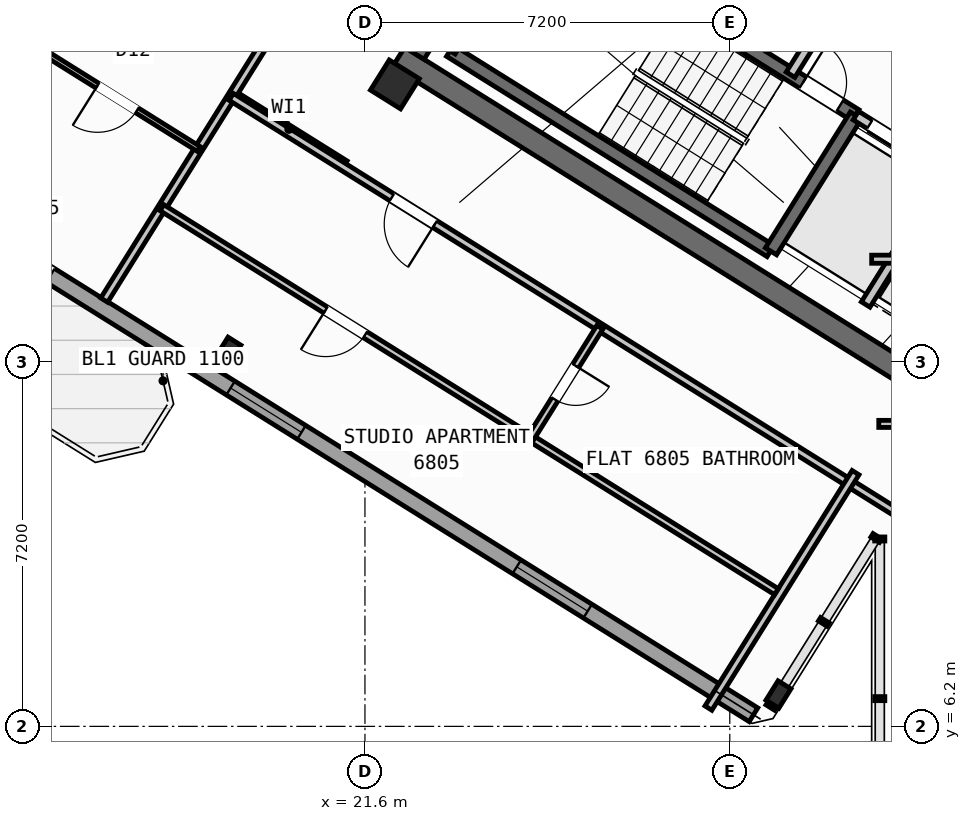
"""IFC4 building model, lengths in metres.
Left out: names, types, materials, properties, quantities, classifications, styles, units other than length and angle.
Written with IfcOpenShell. Run it as: python <this file> out.ifc"""

import sys

from ifc_helpers import new_model, si_unit, direction, frame, frame_2d, origin, origin_2d, place, context, subcontext, project, spatial, rectangle, hollow_rectangle, i_section, extrude, source, transform, mapped, element, fill, save


model = new_model("IFC4")
c1 = context("Model", 3, precision=1e-05, world=origin(), true_north=direction((0.0, 1.0)))
c2 = subcontext(c1, "Body", "Model", "MODEL_VIEW")
j1 = project(units=[si_unit("LENGTHUNIT", "METRE"), si_unit("PLANEANGLEUNIT", "RADIAN")], contexts=[c1])
p1 = place(None, origin())
s1 = spatial("IfcSite", under=j1, at=p1, CompositionType="ELEMENT")
p2 = place(p1, origin())
s2 = spatial("IfcBuilding", under=s1, at=p2, CompositionType="ELEMENT")
p3 = place(p2, frame((0.0, 0.0, 270.0)))
s3 = spatial("IfcBuildingStorey", under=s2, at=p3, CompositionType="ELEMENT", Elevation=270.0)
p4 = place(p3, frame((33.324, 12.503, 0.0), z_axis=(0.0, 0.0, 1.0), x_axis=(-0.848043529849, 0.529926571782, 0.0)))
e1 = element("IfcWall", 1, at=p4, inside=s3, PredefinedType="SHEAR", context=c2, shape_type="SweptSolid", body=[
    extrude(rectangle(XDim=13.04, YDim=0.45, at=frame_2d((6.52, 0.0))), origin(), (0.0, 0.0, 1.0), 3.35),
])
p5 = place(p3, frame((26.007, 24.976, 0.0), z_axis=(0.0, 0.0, 1.0), x_axis=(-0.529931155655, -0.848040665456, 0.0)))
e2 = element("IfcWall", 2, at=p5, inside=s3, PredefinedType="SHEAR", context=c2, shape_type="SweptSolid", body=[
    extrude(rectangle(XDim=6.475, YDim=0.45, at=frame_2d((3.238, 0.0))), origin(), (0.0, 0.0, 1.0), 3.35),
])
m1 = source(origin(), c2, "Body", "SweptSolid", [
    extrude(i_section(OverallWidth=0.3, OverallDepth=0.45, WebThickness=0.014, FlangeThickness=0.026, at=origin_2d()), origin(), (0.0, 0.0, 1.0), 3.6),
])
p6 = place(p3, frame((29.761, 6.829, 0.0), z_axis=(0.0, 0.0, 1.0), x_axis=(-0.848048096156, 0.529919264233, 0.0)))
e3 = element("IfcColumn", 3, at=p6, inside=s3, PredefinedType="COLUMN", context=c2, shape_type="MappedRepresentation", body=[
    mapped(m1, transform((0.0, 0.0, 0.0), scale=1.0)),
])
m2 = source(origin(), c2, "Body", "SweptSolid", [
    extrude(hollow_rectangle(XDim=0.7, YDim=0.7, WallThickness=0.028, at=origin_2d()), origin(), (0.0, 0.0, 1.0), 3.6),
])
p7 = place(p3, frame((22.191, 18.87, 0.0), z_axis=(0.0, 0.0, 1.0), x_axis=(-0.848048096156, 0.529919264233, 0.0)))
e4 = element("IfcColumn", 4, at=p7, inside=s3, PredefinedType="COLUMN", context=c2, shape_type="MappedRepresentation", body=[
    mapped(m2, transform((0.0, 0.0, 0.0), scale=1.0)),
])
p8 = place(p3, frame((18.906, 13.612, 0.0), z_axis=(0.0, 0.0, 1.0), x_axis=(-0.848048096156, 0.529919264233, 0.0)))
e5 = element("IfcColumn", 5, at=p8, inside=s3, PredefinedType="COLUMN", context=c2, shape_type="MappedRepresentation", body=[
    mapped(m1, transform((0.0, 0.0, 0.0), scale=1.0)),
])
p9 = place(p3, frame((29.268, 6.429, 0.0), z_axis=(0.0, 0.0, 1.0), x_axis=(-0.848049971435, 0.529916263149, 0.0)))
e6 = element("IfcWall", 6, at=p9, inside=s3, PredefinedType="STANDARD", context=c2, shape_type="SweptSolid", body=[
    extrude(rectangle(XDim=31.588, YDim=0.32, at=frame_2d((15.794, 0.0))), origin(), (0.0, 0.0, 1.0), 3.35),
])
p10 = place(p9, frame((16.362, 0.0, 0.0)))
e7 = element("IfcOpeningElement", 7, at=p10, cuts=e6, PredefinedType="OPENING", context=c2, shape_type="SweptSolid", body=[
    extrude(rectangle(XDim=1.2, YDim=2.15, at=frame_2d((0.6, 1.075))), frame((0.0, 0.17, 0.0), z_axis=(0.0, -1.0, 0.0), x_axis=(1.0, 0.0, 0.0)), (0.0, 0.0, 1.0), 0.34),
])
p11 = place(p9, frame((3.859, 0.0, 0.9)))
e8 = element("IfcOpeningElement", 8, at=p11, cuts=e6, PredefinedType="OPENING", context=c2, shape_type="SweptSolid", body=[
    extrude(rectangle(XDim=1.65, YDim=1.45, at=frame_2d((0.825, 0.725))), frame((0.0, 0.17, 0.0), z_axis=(0.0, -1.0, 0.0), x_axis=(1.0, 0.0, 0.0)), (0.0, 0.0, 1.0), 0.34),
])
p12 = place(p9, frame((10.519, 0.0, 0.9)))
e9 = element("IfcOpeningElement", 9, at=p12, cuts=e6, PredefinedType="OPENING", context=c2, shape_type="SweptSolid", body=[
    extrude(rectangle(XDim=1.65, YDim=1.45, at=frame_2d((0.825, 0.725))), frame((0.0, 0.17, 0.0), z_axis=(0.0, -1.0, 0.0), x_axis=(1.0, 0.0, 0.0)), (0.0, 0.0, 1.0), 0.34),
])
p13 = place(p9, frame((21.219, 0.0, 0.95)))
e10 = element("IfcOpeningElement", 10, at=p13, cuts=e6, PredefinedType="OPENING", context=c2, shape_type="SweptSolid", body=[
    extrude(rectangle(XDim=1.95, YDim=1.35, at=frame_2d((0.975, 0.675))), frame((0.0, 0.17, 0.0), z_axis=(0.0, -1.0, 0.0), x_axis=(1.0, 0.0, 0.0)), (0.0, 0.0, 1.0), 0.34),
])
p14 = place(p9, frame((26.406, 0.0, 1.0)))
e11 = element("IfcOpeningElement", 11, at=p14, cuts=e6, PredefinedType="OPENING", context=c2, shape_type="SweptSolid", body=[
    extrude(rectangle(XDim=0.9, YDim=1.25, at=frame_2d((0.45, 0.625))), frame((0.0, 0.17, 0.0), z_axis=(0.0, -1.0, 0.0), x_axis=(1.0, 0.0, 0.0)), (0.0, 0.0, 1.0), 0.34),
])
p15 = place(p9, frame((29.143, 0.0, 0.9)))
e12 = element("IfcOpeningElement", 12, at=p15, cuts=e6, PredefinedType="OPENING", context=c2, shape_type="SweptSolid", body=[
    extrude(rectangle(XDim=1.65, YDim=1.45, at=frame_2d((0.825, 0.725))), frame((0.0, 0.17, 0.0), z_axis=(0.0, -1.0, 0.0), x_axis=(1.0, 0.0, 0.0)), (0.0, 0.0, 1.0), 0.34),
])
p16 = place(p3, frame((29.605, 15.581, 0.0), z_axis=(0.0, 0.0, 1.0), x_axis=(-0.848036911448, 0.529937163087, 0.0)))
e13 = element("IfcWall", 13, at=p16, inside=s3, PredefinedType="SHEAR", context=c2, shape_type="SweptSolid", body=[
    extrude(rectangle(XDim=7.46, YDim=0.26, at=frame_2d((3.73, 0.0))), origin(), (0.0, 0.0, 1.0), 3.35),
])
p17 = place(p3, frame((31.28, 18.261, 0.0), z_axis=(0.0, 0.0, 1.0), x_axis=(-0.848051618787, 0.529913626805, 0.0)))
e14 = element("IfcWall", 14, at=p17, inside=s3, PredefinedType="SHEAR", context=c2, shape_type="SweptSolid", body=[
    extrude(rectangle(XDim=7.46, YDim=0.26, at=frame_2d((3.73, 0.0))), origin(), (0.0, 0.0, 1.0), 3.35),
])
p18 = place(p17, frame((0.36, 0.0, 0.0)))
e15 = element("IfcOpeningElement", 15, at=p18, cuts=e14, PredefinedType="OPENING", context=c2, shape_type="SweptSolid", body=[
    extrude(rectangle(XDim=0.86, YDim=2.05, at=frame_2d((0.43, 1.025))), frame((0.0, 0.14, 0.0), z_axis=(0.0, -1.0, 0.0), x_axis=(1.0, 0.0, 0.0)), (0.0, 0.0, 1.0), 0.28),
])
p19 = place(p3, frame((31.288, 18.256, 0.0), z_axis=(0.0, 0.0, 1.0), x_axis=(-0.529943379326, -0.848033026897, 0.0)))
e16 = element("IfcWall", 16, at=p19, inside=s3, PredefinedType="SHEAR", context=c2, shape_type="SweptSolid", body=[
    extrude(rectangle(XDim=3.16, YDim=0.26, at=frame_2d((1.58, 0.0))), origin(), (0.0, 0.0, 1.0), 3.35),
])
p20 = place(p3, frame((24.945, 22.22, 0.0), z_axis=(0.0, 0.0, 1.0), x_axis=(-0.529908658664, -0.84805472316, 0.0)))
e17 = element("IfcWall", 17, at=p20, inside=s3, PredefinedType="SHEAR", context=c2, shape_type="SweptSolid", body=[
    extrude(rectangle(XDim=3.16, YDim=0.26, at=frame_2d((1.58, 0.0))), origin(), (0.0, 0.0, 1.0), 3.35),
])
p21 = place(p3, frame((34.933, 15.978, 0.0), z_axis=(0.0, 0.0, 1.0), x_axis=(-0.848055739377, 0.529907032327, 0.0)))
e18 = element("IfcWall", 18, at=p21, inside=s3, PredefinedType="STANDARD", context=c2, shape_type="SweptSolid", body=[
    extrude(rectangle(XDim=4.298, YDim=0.2, at=frame_2d((2.149, 0.0))), origin(), (0.0, 0.0, 1.0), 3.34),
])
p22 = place(p21, frame((0.448, 0.0, 0.0)))
e19 = element("IfcOpeningElement", 19, at=p22, cuts=e18, PredefinedType="OPENING", context=c2, shape_type="SweptSolid", body=[
    extrude(rectangle(XDim=1.3, YDim=2.2, at=frame_2d((0.65, 1.1))), frame((0.0, 0.11, 0.0), z_axis=(0.0, -1.0, 0.0), x_axis=(1.0, 0.0, 0.0)), (0.0, 0.0, 1.0), 0.22),
])
p23 = place(p21, frame((2.523, 0.0, 0.0)))
e20 = element("IfcOpeningElement", 20, at=p23, cuts=e18, PredefinedType="OPENING", context=c2, shape_type="SweptSolid", body=[
    extrude(rectangle(XDim=1.45, YDim=2.25, at=frame_2d((0.725, 1.125))), frame((0.0, 0.11, 0.0), z_axis=(0.0, -1.0, 0.0), x_axis=(1.0, 0.0, 0.0)), (0.0, 0.0, 1.0), 0.22),
])
p24 = place(p3, frame((36.459, 18.421, 0.0), z_axis=(0.0, 0.0, 1.0), x_axis=(-0.848059591691, 0.529900867089, 0.0)))
e21 = element("IfcWall", 21, at=p24, inside=s3, PredefinedType="STANDARD", context=c2, shape_type="SweptSolid", body=[
    extrude(rectangle(XDim=5.818, YDim=0.2, at=frame_2d((2.909, 0.0))), origin(), (0.0, 0.0, 1.0), 3.34),
])
p25 = place(p24, frame((2.598, 0.0, 0.0)))
e22 = element("IfcOpeningElement", 22, at=p25, cuts=e21, PredefinedType="OPENING", context=c2, shape_type="SweptSolid", body=[
    extrude(rectangle(XDim=1.15, YDim=2.1, at=frame_2d((0.575, 1.05))), frame((0.0, 0.11, 0.0), z_axis=(0.0, -1.0, 0.0), x_axis=(1.0, 0.0, 0.0)), (0.0, 0.0, 1.0), 0.22),
])
p26 = place(p3, frame((33.029, 17.003, 0.0), z_axis=(0.0, 0.0, 1.0), x_axis=(-0.529916267533, -0.848049968695, 0.0)))
e23 = element("IfcWall", 23, at=p26, inside=s3, PredefinedType="STANDARD", context=c2, shape_type="SweptSolid", body=[
    extrude(rectangle(XDim=2.92, YDim=0.2, at=frame_2d((1.46, 0.0))), origin(), (0.0, 0.0, 1.0), 3.34),
])
p27 = place(p3, frame((31.525, 21.504, 0.0), z_axis=(0.0, 0.0, 1.0), x_axis=(-0.529907497854, -0.848055448493, 0.0)))
e24 = element("IfcWall", 24, at=p27, inside=s3, PredefinedType="STANDARD", context=c2, shape_type="SweptSolid", body=[
    extrude(rectangle(XDim=2.88, YDim=0.2, at=frame_2d((1.44, 0.0))), origin(), (0.0, 0.0, 1.0), 3.34),
])
p28 = place(p3, frame((21.206, 17.292, 0.0), z_axis=(0.0, 0.0, 1.0), x_axis=(-0.848050851465, 0.529914854792, 0.0)))
e25 = element("IfcWall", 25, at=p28, inside=s3, PredefinedType="PARTITIONING", context=c2, shape_type="SweptSolid", body=[
    extrude(rectangle(XDim=2.61, YDim=0.16, at=frame_2d((1.305, 0.0))), origin(), (0.0, 0.0, 1.0), 3.34),
])
p29 = place(p3, frame((21.329, 22.416, 0.0), z_axis=(0.0, 0.0, 1.0), x_axis=(-0.529920220799, -0.848047498427, 0.0)))
e26 = element("IfcWall", 26, at=p29, inside=s3, PredefinedType="PARTITIONING", context=c2, shape_type="SweptSolid", body=[
    extrude(rectangle(XDim=9.2, YDim=0.16, at=frame_2d((4.6, 0.0))), origin(), (0.0, 0.0, 1.0), 3.34),
])
p30 = place(p3, frame((16.572, 21.954, 0.0), z_axis=(0.0, 0.0, 1.0), x_axis=(-0.529904903214, -0.848057069748, 0.0)))
e27 = element("IfcWall", 27, at=p30, inside=s3, PredefinedType="PARTITIONING", context=c2, shape_type="SweptSolid", body=[
    extrude(rectangle(XDim=5.601, YDim=0.16, at=frame_2d((2.801, 0.0))), origin(), (0.0, 0.0, 1.0), 2.875),
])
p31 = place(p3, frame((18.318, 17.597, 0.0), z_axis=(0.0, 0.0, 1.0), x_axis=(-0.848059820872, 0.529900500304, 0.0)))
e28 = element("IfcWall", 28, at=p31, inside=s3, PredefinedType="PARTITIONING", context=c2, shape_type="SweptSolid", body=[
    extrude(rectangle(XDim=3.79, YDim=0.11, at=frame_2d((1.895, 0.0))), origin(), (0.0, 0.0, 1.0), 3.34),
])
p32 = place(p31, frame((1.435, 0.0, 0.0)))
e29 = element("IfcOpeningElement", 29, at=p32, cuts=e28, PredefinedType="OPENING", context=c2, shape_type="SweptSolid", body=[
    extrude(rectangle(XDim=0.92, YDim=2.08, at=frame_2d((0.46, 1.04))), frame((0.0, 0.065, 0.0), z_axis=(0.0, -1.0, 0.0), x_axis=(1.0, 0.0, 0.0)), (0.0, 0.0, 1.0), 0.13),
])
p33 = place(p3, frame((32.164, 10.374, 0.0), z_axis=(0.0, 0.0, 1.0), x_axis=(-0.848044107957, 0.529925646633, 0.0)))
e30 = element("IfcWall", 30, at=p33, inside=s3, PredefinedType="PARTITIONING", context=c2, shape_type="SweptSolid", body=[
    extrude(rectangle(XDim=15.57, YDim=0.16, at=frame_2d((7.785, 0.0))), origin(), (0.0, 0.0, 1.0), 3.34),
])
p34 = place(p33, frame((10.83, 0.0, 0.0)))
e31 = element("IfcOpeningElement", 31, at=p34, cuts=e30, PredefinedType="OPENING", context=c2, shape_type="SweptSolid", body=[
    extrude(rectangle(XDim=1.0, YDim=2.1, at=frame_2d((0.5, 1.05))), frame((0.0, 0.09, 0.0), z_axis=(0.0, -1.0, 0.0), x_axis=(1.0, 0.0, 0.0)), (0.0, 0.0, 1.0), 0.18),
])
p35 = place(p3, frame((31.282, 11.208, 0.0), z_axis=(0.0, 0.0, 1.0), x_axis=(-0.529938869374, -0.84803584519, 0.0)))
e32 = element("IfcWall", 32, at=p35, inside=s3, PredefinedType="PARTITIONING", context=c2, shape_type="SweptSolid", body=[
    extrude(rectangle(XDim=5.48, YDim=0.16, at=frame_2d((2.74, 0.0))), origin(), (0.0, 0.0, 1.0), 3.34),
])
p36 = place(p3, frame((29.72, 8.859, 0.0), z_axis=(0.0, 0.0, 1.0), x_axis=(-0.848049134363, 0.529917602752, 0.0)))
e33 = element("IfcWall", 33, at=p36, inside=s3, PredefinedType="PLUMBINGWALL", context=c2, shape_type="SweptSolid", body=[
    extrude(rectangle(XDim=14.3, YDim=0.14, at=frame_2d((7.15, 0.0))), origin(), (0.0, 0.0, 1.0), 3.34),
])
p37 = place(p36, frame((9.57, 0.0, 0.0)))
e34 = element("IfcOpeningElement", 34, at=p37, cuts=e33, PredefinedType="OPENING", context=c2, shape_type="SweptSolid", body=[
    extrude(rectangle(XDim=0.92, YDim=2.08, at=frame_2d((0.46, 1.04))), frame((0.0, 0.08, 0.0), z_axis=(0.0, -1.0, 0.0), x_axis=(1.0, 0.0, 0.0)), (0.0, 0.0, 1.0), 0.16),
])
p38 = place(p3, frame((26.237, 14.078, 0.0), z_axis=(0.0, 0.0, 1.0), x_axis=(-0.52995640672, -0.848024885824, 0.0)))
e35 = element("IfcWall", 35, at=p38, inside=s3, PredefinedType="PLUMBINGWALL", context=c2, shape_type="SweptSolid", body=[
    extrude(rectangle(XDim=2.58, YDim=0.14, at=frame_2d((1.29, 0.0))), origin(), (0.0, 0.0, 1.0), 3.34),
])
p39 = place(p38, frame((0.9, 0.0, 0.0)))
e36 = element("IfcOpeningElement", 36, at=p39, cuts=e35, PredefinedType="OPENING", context=c2, shape_type="SweptSolid", body=[
    extrude(rectangle(XDim=0.78, YDim=2.05, at=frame_2d((0.39, 1.025))), frame((0.0, 0.08, 0.0), z_axis=(0.0, -1.0, 0.0), x_axis=(1.0, 0.0, 0.0)), (0.0, 0.0, 1.0), 0.16),
])
p40 = place(p3, frame((31.6, 15.42, 0.0), z_axis=(0.0, 0.0, 1.0), x_axis=(1.0, 0.0, 0.0)))
e37 = element("IfcWall", 37, at=p40, inside=s3, PredefinedType="PARTITIONING", context=c2, shape_type="SweptSolid", body=[
    extrude(rectangle(XDim=2.984, YDim=0.16, at=frame_2d((1.492, 0.0))), origin(), (0.0, 0.0, 1.0), 3.34),
])
p41 = place(p3, frame((31.74, 12.17, 0.0), z_axis=(0.0, 0.0, 1.0), x_axis=(1.0, 0.0, 0.0)))
e38 = element("IfcWall", 38, at=p41, inside=s3, PredefinedType="PLUMBINGWALL", context=c2, shape_type="SweptSolid", body=[
    extrude(rectangle(XDim=0.931, YDim=0.14, at=frame_2d((0.466, 0.0))), origin(), (0.0, 0.0, 1.0), 3.34),
])
m3 = source(origin(), c2, "Body", "SweptSolid", [
    extrude(rectangle(XDim=1.65, YDim=1.45, at=frame_2d((0.825, 0.725))), frame((0.0, 0.03, 0.0), z_axis=(0.0, -1.0, 0.0), x_axis=(1.0, 0.0, 0.0)), (0.0, 0.0, 1.0), 0.06),
])
p42 = place(p11, origin())
e39 = element("IfcWindow", 39, at=p42, inside=s3, PartitioningType="SINGLE_PANEL", PredefinedType="WINDOW", context=c2, shape_type="MappedRepresentation", body=[
    mapped(m3, transform((0.0, 0.0, 0.0), scale=1.0)),
])
fill(e8, e39)
p43 = place(p12, origin())
e40 = element("IfcWindow", 40, at=p43, inside=s3, PartitioningType="SINGLE_PANEL", PredefinedType="WINDOW", context=c2, shape_type="MappedRepresentation", body=[
    mapped(m3, transform((0.0, 0.0, 0.0), scale=1.0)),
])
fill(e9, e40)
m4 = source(origin(), c2, "Body", "SweptSolid", [
    extrude(rectangle(XDim=0.86, YDim=2.05, at=frame_2d((0.43, 1.025))), frame((0.0, 0.025, 0.0), z_axis=(0.0, -1.0, 0.0), x_axis=(1.0, 0.0, 0.0)), (0.0, 0.0, 1.0), 0.05),
])
p44 = place(p18, frame((0.86, 0.0, 0.0), z_axis=(0.0, 0.0, 1.0), x_axis=(-1.0, 0.0, 0.0)))
e41 = element("IfcDoor", 41, at=p44, inside=s3, OperationType="SINGLE_SWING_LEFT", PredefinedType="DOOR", context=c2, shape_type="MappedRepresentation", body=[
    mapped(m4, transform((0.0, 0.0, 0.0), scale=1.0)),
])
fill(e15, e41)
m5 = source(origin(), c2, "Body", "SweptSolid", [
    extrude(rectangle(XDim=1.45, YDim=2.25, at=frame_2d((0.725, 1.125))), frame((0.0, 0.025, 0.0), z_axis=(0.0, -1.0, 0.0), x_axis=(1.0, 0.0, 0.0)), (0.0, 0.0, 1.0), 0.05),
])
p45 = place(p23, origin())
e42 = element("IfcDoor", 42, at=p45, inside=s3, OperationType="DOUBLE_DOOR_SLIDING", PredefinedType="DOOR", context=c2, shape_type="MappedRepresentation", body=[
    mapped(m5, transform((0.0, 0.0, 0.0), scale=1.0)),
])
fill(e20, e42)
m6 = source(origin(), c2, "Body", "SweptSolid", [
    extrude(rectangle(XDim=0.92, YDim=2.08, at=frame_2d((0.46, 1.04))), frame((0.0, 0.025, 0.0), z_axis=(0.0, -1.0, 0.0), x_axis=(1.0, 0.0, 0.0)), (0.0, 0.0, 1.0), 0.05),
])
p46 = place(p32, origin())
e43 = element("IfcDoor", 43, at=p46, inside=s3, OperationType="SINGLE_SWING_RIGHT", PredefinedType="DOOR", context=c2, shape_type="MappedRepresentation", body=[
    mapped(m6, transform((0.0, 0.0, 0.0), scale=1.0)),
])
fill(e29, e43)
m7 = source(origin(), c2, "Body", "SweptSolid", [
    extrude(rectangle(XDim=1.0, YDim=2.1, at=frame_2d((0.5, 1.05))), frame((0.0, 0.025, 0.0), z_axis=(0.0, -1.0, 0.0), x_axis=(1.0, 0.0, 0.0)), (0.0, 0.0, 1.0), 0.05),
])
p47 = place(p34, origin())
e44 = element("IfcDoor", 44, at=p47, inside=s3, OperationType="SINGLE_SWING_LEFT", PredefinedType="DOOR", context=c2, shape_type="MappedRepresentation", body=[
    mapped(m7, transform((0.0, 0.0, 0.0), scale=1.0)),
])
fill(e31, e44)
p48 = place(p37, origin())
e45 = element("IfcDoor", 45, at=p48, inside=s3, OperationType="SINGLE_SWING_RIGHT", PredefinedType="DOOR", context=c2, shape_type="MappedRepresentation", body=[
    mapped(m6, transform((0.0, 0.0, 0.0), scale=1.0)),
])
fill(e34, e45)
m8 = source(origin(), c2, "Body", "SweptSolid", [
    extrude(rectangle(XDim=0.78, YDim=2.05, at=frame_2d((0.39, 1.025))), frame((0.0, 0.025, 0.0), z_axis=(0.0, -1.0, 0.0), x_axis=(1.0, 0.0, 0.0)), (0.0, 0.0, 1.0), 0.05),
])
p49 = place(p39, origin())
e46 = element("IfcDoor", 46, at=p49, inside=s3, OperationType="SINGLE_SWING_LEFT", PredefinedType="DOOR", context=c2, shape_type="MappedRepresentation", body=[
    mapped(m8, transform((0.0, 0.0, 0.0), scale=1.0)),
])
fill(e36, e46)
save(model, sys.argv[1])
